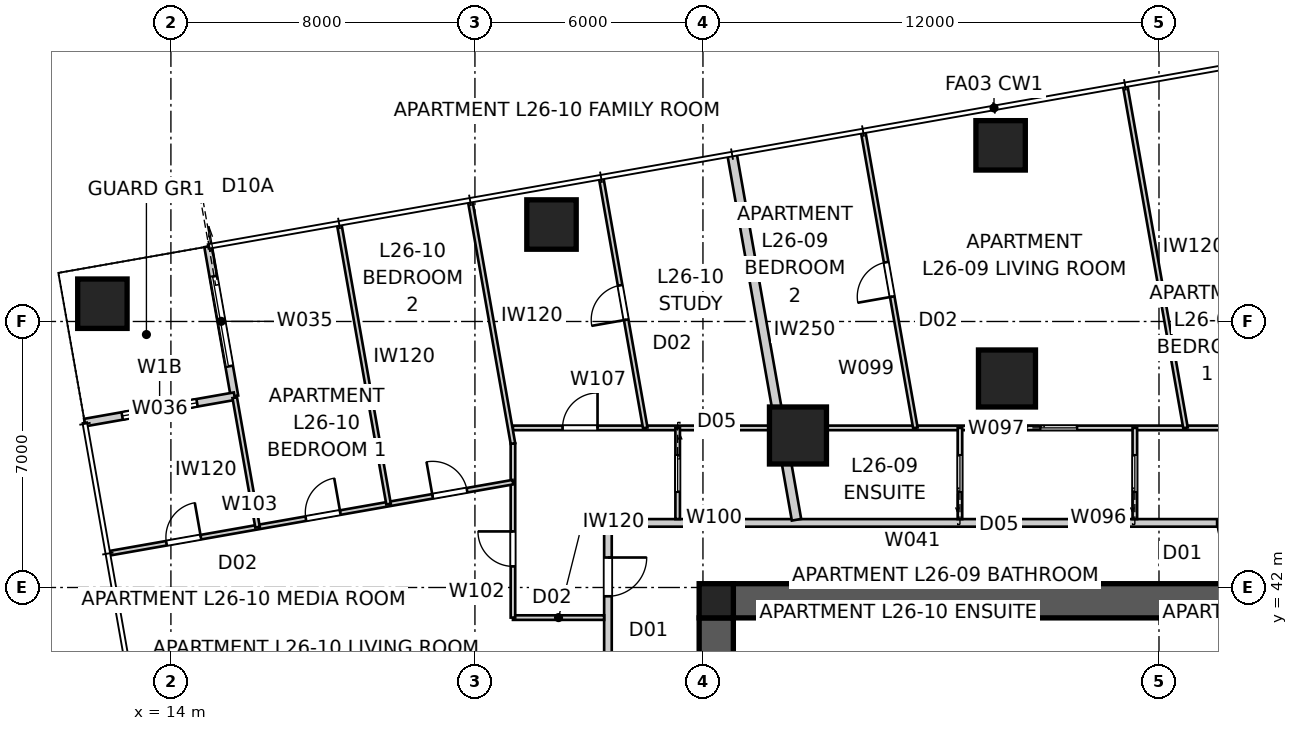
"""IFC4 building model, lengths in metres.
Left out: names, types, materials, properties, quantities, classifications, styles, units other than length and angle.
Written with IfcOpenShell. Run it as: python <this file> out.ifc"""

import sys

from ifc_helpers import new_model, si_unit, direction, frame, frame_2d, origin, origin_2d, place, context, subcontext, project, spatial, polyline, rectangle, outline, extrude, element, fill, save


model = new_model("IFC4")
c1 = context("Model", 3, precision=1e-05, world=origin(), true_north=direction((0.0, 1.0)))
c2 = subcontext(c1, "Body", "Model", "MODEL_VIEW")
j1 = project(units=[si_unit("LENGTHUNIT", "METRE"), si_unit("PLANEANGLEUNIT", "RADIAN")], contexts=[c1])
p1 = place(None, origin())
s1 = spatial("IfcSite", under=j1, at=p1, CompositionType="ELEMENT")
p2 = place(p1, origin())
s2 = spatial("IfcBuilding", under=s1, at=p2, CompositionType="ELEMENT")
p3 = place(p2, frame((0.0, 0.0, 96.4)))
s3 = spatial("IfcBuildingStorey", under=s2, at=p3, CompositionType="ELEMENT", Elevation=96.4)
p4 = place(p3, frame((28.8, 41.65, 0.0), z_axis=(0.0, 0.0, 1.0), x_axis=(1.0, 0.0, 0.0)))
e1 = element("IfcWall", 1, at=p4, inside=s3, PredefinedType="SHEAR", context=c2, shape_type="SweptSolid", body=[
    extrude(outline(polyline([(0.0, -0.45), (22.4, -0.45), (22.4, -0.025), (22.85, -0.025), (22.85, 0.025), (22.4, 0.025), (22.4, 0.45), (0.0, 0.45), (0.0, 0.025), (-0.45, 0.025), (-0.45, -0.025), (0.0, -0.025), (0.0, -0.45)])), origin(), (0.0, 0.0, 1.0), 3.4),
])
p5 = place(p3, frame((28.35, 41.2, 0.0), z_axis=(0.0, 0.0, 1.0), x_axis=(0.0, -1.0, 0.0)))
e2 = element("IfcWall", 2, at=p5, inside=s3, PredefinedType="SHEAR", context=c2, shape_type="SweptSolid", body=[
    extrude(outline(polyline([(0.0, -0.45), (22.4, -0.45), (22.4, -0.025), (22.85, -0.025), (22.85, 0.025), (22.4, 0.025), (22.4, 0.45), (0.0, 0.45), (0.0, 0.025), (-0.45, 0.025), (-0.45, -0.025), (0.0, -0.025), (0.0, -0.45)])), origin(), (0.0, 0.0, 1.0), 3.4),
])
p6 = place(p5, frame((11.14, 0.0, 0.0)))
e3 = element("IfcOpeningElement", 3, at=p6, cuts=e2, PredefinedType="OPENING", context=c2, shape_type="SweptSolid", body=[
    extrude(rectangle(XDim=1.02, YDim=2.4, at=frame_2d((0.51, 1.2))), frame((0.0, 0.46, 0.0), z_axis=(0.0, -1.0, 0.0), x_axis=(1.0, 0.0, 0.0)), (0.0, 0.0, 1.0), 0.92),
])
p7 = place(p3, frame((28.35, 41.65, 0.0), z_axis=(0.0, 0.0, 1.0), x_axis=(1.0, 0.0, 0.0)))
e4 = element("IfcColumn", 4, at=p7, inside=s3, PredefinedType="COLUMN", context=c2, shape_type="SweptSolid", body=[
    extrude(rectangle(XDim=0.9, YDim=0.9, at=origin_2d()), origin(), (0.0, 0.0, 1.0), 3.4),
])
for number, where, z_axis, x_axis in (
    (5, (35.833, 53.635, 0.0), (0.0, 0.0, 1.0), (1.0, 0.0, 0.0)),
    (6, (24.015, 51.552, 0.0), (0.0, 0.0, 1.0), (1.0, 0.0, 0.0)),
    (7, (12.197, 49.468, 0.0), (0.0, 0.0, 1.0), (1.0, 0.0, 0.0)),
):
    element("IfcColumn", number, at=place(p3, frame(where, z_axis=z_axis, x_axis=x_axis)), inside=s3, PredefinedType="COLUMN", context=c2, shape_type="SweptSolid", body=[
        extrude(rectangle(XDim=1.3, YDim=1.3, at=origin_2d()), origin(), (0.0, 0.0, 1.0), 3.4),
    ])
for number, where, z_axis, x_axis in (
    (8, (36.0, 47.5, 0.0), (0.0, 0.0, 1.0), (1.0, 0.0, 0.0)),
    (9, (30.5, 46.0, 0.0), (0.0, 0.0, 1.0), (1.0, 0.0, 0.0)),
):
    element("IfcColumn", number, at=place(p3, frame(where, z_axis=z_axis, x_axis=x_axis)), inside=s3, PredefinedType="COLUMN", context=c2, shape_type="SweptSolid", body=[
        extrude(rectangle(XDim=1.5, YDim=1.5, at=origin_2d()), origin(), (0.0, 0.0, 1.0), 3.4),
    ])
p8 = place(p3, frame((14.978, 50.974, 0.0), z_axis=(0.0, 0.0, 1.0), x_axis=(0.173646056486, -0.984808127031, 0.0)))
e10 = element("IfcWall", 10, at=p8, inside=s3, PredefinedType="SOLIDWALL", context=c2, shape_type="SweptSolid", body=[
    extrude(rectangle(XDim=4.0, YDim=0.2, at=frame_2d((2.0, 0.0))), origin(), (0.0, 0.0, 1.0), 3.25),
])
p9 = place(p8, frame((0.8, 0.0, 0.0)))
e11 = element("IfcOpeningElement", 11, at=p9, cuts=e10, PredefinedType="OPENING", context=c2, shape_type="SweptSolid", body=[
    extrude(rectangle(XDim=2.4, YDim=2.1, at=frame_2d((1.2, 1.05))), frame((0.0, 0.11, 0.0), z_axis=(0.0, -1.0, 0.0), x_axis=(1.0, 0.0, 0.0)), (0.0, 0.0, 1.0), 0.22),
])
p10 = place(p3, frame((15.672, 47.034, 0.0), z_axis=(0.0, 0.0, 1.0), x_axis=(-0.984808127031, -0.173646056486, 0.0)))
e12 = element("IfcWall", 12, at=p10, inside=s3, PredefinedType="SOLIDWALL", context=c2, shape_type="SweptSolid", body=[
    extrude(rectangle(XDim=4.0, YDim=0.2, at=frame_2d((2.0, 0.0))), origin(), (0.0, 0.0, 1.0), 3.25),
])
p11 = place(p10, frame((1.0, 0.0, 0.45)))
e13 = element("IfcOpeningElement", 13, at=p11, cuts=e12, PredefinedType="OPENING", context=c2, shape_type="SweptSolid", body=[
    extrude(rectangle(XDim=2.0, YDim=1.8, at=frame_2d((1.0, 0.9))), frame((0.0, 0.11, 0.0), z_axis=(0.0, -1.0, 0.0), x_axis=(1.0, 0.0, 0.0)), (0.0, 0.0, 1.0), 0.22),
])
p12 = place(p3, frame((54.5, 43.7, 0.0), z_axis=(0.0, 0.0, 1.0), x_axis=(-1.0, 0.0, 0.0)))
e14 = element("IfcWall", 14, at=p12, inside=s3, PredefinedType="PARTITIONING", context=c2, shape_type="SweptSolid", body=[
    extrude(rectangle(XDim=29.0, YDim=0.2, at=frame_2d((14.5, 0.0))), origin(), (0.0, 0.0, 1.0), 3.25),
])
p13 = place(p12, frame((11.951, 0.0, 0.0)))
e15 = element("IfcOpeningElement", 15, at=p13, cuts=e14, PredefinedType="OPENING", context=c2, shape_type="SweptSolid", body=[
    extrude(rectangle(XDim=1.02, YDim=2.34, at=frame_2d((0.51, 1.17))), frame((0.0, 0.11, 0.0), z_axis=(0.0, -1.0, 0.0), x_axis=(1.0, 0.0, 0.0)), (0.0, 0.0, 1.0), 0.22),
])
p14 = place(p12, frame((4.795, 0.0, 0.0)))
e16 = element("IfcOpeningElement", 16, at=p14, cuts=e14, PredefinedType="OPENING", context=c2, shape_type="SweptSolid", body=[
    extrude(rectangle(XDim=1.02, YDim=2.34, at=frame_2d((0.51, 1.17))), frame((0.0, 0.11, 0.0), z_axis=(0.0, -1.0, 0.0), x_axis=(1.0, 0.0, 0.0)), (0.0, 0.0, 1.0), 0.22),
])
p15 = place(p3, frame((25.5, 43.7, 0.0), z_axis=(0.0, 0.0, 1.0), x_axis=(0.0, -1.0, 0.0)))
e17 = element("IfcWall", 17, at=p15, inside=s3, PredefinedType="PARTITIONING", context=c2, shape_type="SweptSolid", body=[
    extrude(rectangle(XDim=27.4, YDim=0.2, at=frame_2d((13.7, 0.0))), origin(), (0.0, 0.0, 1.0), 3.25),
])
p16 = place(p15, frame((24.333, 0.0, 0.0)))
e18 = element("IfcOpeningElement", 18, at=p16, cuts=e17, PredefinedType="OPENING", context=c2, shape_type="SweptSolid", body=[
    extrude(rectangle(XDim=1.02, YDim=2.1, at=frame_2d((0.51, 1.05))), frame((0.0, 0.11, 0.0), z_axis=(0.0, -1.0, 0.0), x_axis=(1.0, 0.0, 0.0)), (0.0, 0.0, 1.0), 0.22),
])
p17 = place(p15, frame((10.631, 0.0, 0.0)))
e19 = element("IfcOpeningElement", 19, at=p17, cuts=e17, PredefinedType="OPENING", context=c2, shape_type="SweptSolid", body=[
    extrude(rectangle(XDim=1.02, YDim=2.34, at=frame_2d((0.51, 1.17))), frame((0.0, 0.11, 0.0), z_axis=(0.0, -1.0, 0.0), x_axis=(1.0, 0.0, 0.0)), (0.0, 0.0, 1.0), 0.22),
])
p18 = place(p15, frame((0.911, 0.0, 0.0)))
e20 = element("IfcOpeningElement", 20, at=p18, cuts=e17, PredefinedType="OPENING", context=c2, shape_type="SweptSolid", body=[
    extrude(rectangle(XDim=1.02, YDim=2.34, at=frame_2d((0.51, 1.17))), frame((0.0, 0.11, 0.0), z_axis=(0.0, -1.0, 0.0), x_axis=(1.0, 0.0, 0.0)), (0.0, 0.0, 1.0), 0.22),
])
p19 = place(p3, frame((28.765, 53.405, 0.0), z_axis=(0.0, 0.0, 1.0), x_axis=(0.173658469802, -0.984805938176, 0.0)))
e21 = element("IfcWall", 21, at=p19, inside=s3, PredefinedType="PARTITIONING", context=c2, shape_type="SweptSolid", body=[
    extrude(rectangle(XDim=9.771, YDim=0.25, at=frame_2d((4.885, 0.0))), origin(), (0.0, 0.0, 1.0), 3.25),
])
p20 = place(p3, frame((23.0, 46.2, 0.0), z_axis=(0.0, 0.0, 1.0), x_axis=(1.0, 0.0, 0.0)))
e22 = element("IfcWall", 22, at=p20, inside=s3, PredefinedType="PARTITIONING", context=c2, shape_type="SweptSolid", body=[
    extrude(rectangle(XDim=34.0, YDim=0.12, at=frame_2d((17.0, 0.0))), origin(), (0.0, 0.0, 1.0), 2.55),
])
p21 = place(p20, frame((18.989, 0.0, 0.0)))
e23 = element("IfcOpeningElement", 23, at=p21, cuts=e22, PredefinedType="OPENING", context=c2, shape_type="SweptSolid", body=[
    extrude(rectangle(XDim=0.92, YDim=2.34, at=frame_2d((0.46, 1.17))), frame((0.0, 0.07, 0.0), z_axis=(0.0, -1.0, 0.0), x_axis=(1.0, 0.0, 0.0)), (0.0, 0.0, 1.0), 0.14),
])
p22 = place(p20, frame((1.306, 0.0, 0.0)))
e24 = element("IfcOpeningElement", 24, at=p22, cuts=e22, PredefinedType="OPENING", context=c2, shape_type="SweptSolid", body=[
    extrude(rectangle(XDim=0.92, YDim=2.34, at=frame_2d((0.46, 1.17))), frame((0.0, 0.07, 0.0), z_axis=(0.0, -1.0, 0.0), x_axis=(1.0, 0.0, 0.0)), (0.0, 0.0, 1.0), 0.14),
])
p23 = place(p20, frame((13.884, 0.0, 0.0)))
e25 = element("IfcOpeningElement", 25, at=p23, cuts=e22, PredefinedType="OPENING", context=c2, shape_type="SweptSolid", body=[
    extrude(rectangle(XDim=0.96, YDim=2.1, at=frame_2d((0.48, 1.05))), frame((0.0, 0.07, 0.0), z_axis=(0.0, -1.0, 0.0), x_axis=(1.0, 0.0, 0.0)), (0.0, 0.0, 1.0), 0.14),
])
p24 = place(p20, frame((21.929, 0.0, 0.0)))
e26 = element("IfcOpeningElement", 26, at=p24, cuts=e22, PredefinedType="OPENING", context=c2, shape_type="SweptSolid", body=[
    extrude(rectangle(XDim=0.96, YDim=2.1, at=frame_2d((0.48, 1.05))), frame((0.0, 0.07, 0.0), z_axis=(0.0, -1.0, 0.0), x_axis=(1.0, 0.0, 0.0)), (0.0, 0.0, 1.0), 0.14),
])
p25 = place(p3, frame((39.365, 43.8, 0.0), z_axis=(0.0, 0.0, 1.0), x_axis=(0.0, 1.0, 0.0)))
e27 = element("IfcWall", 27, at=p25, inside=s3, PredefinedType="PARTITIONING", context=c2, shape_type="SweptSolid", body=[
    extrude(rectangle(XDim=2.4, YDim=0.12, at=frame_2d((1.2, 0.0))), origin(), (0.0, 0.0, 1.0), 3.25),
])
p26 = place(p25, frame((0.72, 0.0, 0.0)))
e28 = element("IfcOpeningElement", 28, at=p26, cuts=e27, PredefinedType="OPENING", context=c2, shape_type="SweptSolid", body=[
    extrude(rectangle(XDim=0.96, YDim=2.1, at=frame_2d((0.48, 1.05))), frame((0.0, 0.07, 0.0), z_axis=(0.0, -1.0, 0.0), x_axis=(1.0, 0.0, 0.0)), (0.0, 0.0, 1.0), 0.14),
])
p27 = place(p3, frame((34.763, 43.8, 0.0), z_axis=(0.0, 0.0, 1.0), x_axis=(0.0, 1.0, 0.0)))
e29 = element("IfcWall", 29, at=p27, inside=s3, PredefinedType="PARTITIONING", context=c2, shape_type="SweptSolid", body=[
    extrude(rectangle(XDim=2.4, YDim=0.12, at=frame_2d((1.2, 0.0))), origin(), (0.0, 0.0, 1.0), 3.25),
])
p28 = place(p27, frame((0.72, 0.0, 0.0)))
e30 = element("IfcOpeningElement", 30, at=p28, cuts=e29, PredefinedType="OPENING", context=c2, shape_type="SweptSolid", body=[
    extrude(rectangle(XDim=0.96, YDim=2.1, at=frame_2d((0.48, 1.05))), frame((0.0, 0.07, 0.0), z_axis=(0.0, -1.0, 0.0), x_axis=(1.0, 0.0, 0.0)), (0.0, 0.0, 1.0), 0.14),
])
p29 = place(p3, frame((39.113, 55.188, 0.0), z_axis=(0.0, 0.0, 1.0), x_axis=(0.173652576186, -0.984806977424, 0.0)))
e31 = element("IfcWall", 31, at=p29, inside=s3, PredefinedType="PARTITIONING", context=c2, shape_type="SweptSolid", body=[
    extrude(rectangle(XDim=9.127, YDim=0.12, at=frame_2d((4.563, 0.0))), origin(), (0.0, 0.0, 1.0), 3.25),
])
p30 = place(p3, frame((33.59, 46.2, 0.0), z_axis=(0.0, 0.0, 1.0), x_axis=(-0.173645935638, 0.98480814834, 0.0)))
e32 = element("IfcWall", 32, at=p30, inside=s3, PredefinedType="PARTITIONING", context=c2, shape_type="SweptSolid", body=[
    extrude(rectangle(XDim=7.893, YDim=0.12, at=frame_2d((3.947, 0.0))), origin(), (0.0, 0.0, 1.0), 3.25),
])
p31 = place(p30, frame((3.507, 0.0, 0.0)))
e33 = element("IfcOpeningElement", 33, at=p31, cuts=e32, PredefinedType="OPENING", context=c2, shape_type="SweptSolid", body=[
    extrude(rectangle(XDim=0.92, YDim=2.34, at=frame_2d((0.46, 1.17))), frame((0.0, 0.07, 0.0), z_axis=(0.0, -1.0, 0.0), x_axis=(1.0, 0.0, 0.0)), (0.0, 0.0, 1.0), 0.14),
])
p32 = place(p3, frame((27.335, 46.2, 0.0), z_axis=(0.0, 0.0, 1.0), x_axis=(0.0, -1.0, 0.0)))
e34 = element("IfcWall", 34, at=p32, inside=s3, PredefinedType="PARTITIONING", context=c2, shape_type="SweptSolid", body=[
    extrude(rectangle(XDim=2.4, YDim=0.12, at=frame_2d((1.2, 0.0))), origin(), (0.0, 0.0, 1.0), 2.722),
])
p33 = place(p32, frame((0.72, 0.0, 0.0)))
e35 = element("IfcOpeningElement", 35, at=p33, cuts=e34, PredefinedType="OPENING", context=c2, shape_type="SweptSolid", body=[
    extrude(rectangle(XDim=0.96, YDim=2.1, at=frame_2d((0.48, 1.05))), frame((0.0, 0.07, 0.0), z_axis=(0.0, -1.0, 0.0), x_axis=(1.0, 0.0, 0.0)), (0.0, 0.0, 1.0), 0.14),
])
p34 = place(p3, frame((25.4, 41.208, 0.0), z_axis=(0.0, 0.0, 1.0), x_axis=(-1.0, 0.0, 0.0)))
e36 = element("IfcWall", 36, at=p34, inside=s3, PredefinedType="PARTITIONING", context=c2, shape_type="SweptSolid", body=[
    extrude(rectangle(XDim=2.4, YDim=0.12, at=frame_2d((1.2, 0.0))), origin(), (0.0, 0.0, 1.0), 2.638),
])
p35 = place(p3, frame((23.0, 41.208, 0.0), z_axis=(0.0, 0.0, 1.0), x_axis=(0.0, 1.0, 0.0)))
e37 = element("IfcWall", 37, at=p35, inside=s3, PredefinedType="PARTITIONING", context=c2, shape_type="SweptSolid", body=[
    extrude(rectangle(XDim=4.581, YDim=0.12, at=frame_2d((2.291, 0.0))), origin(), (0.0, 0.0, 1.0), 2.638),
])
p36 = place(p35, frame((1.348, 0.0, 0.0)))
e38 = element("IfcOpeningElement", 38, at=p36, cuts=e37, PredefinedType="OPENING", context=c2, shape_type="SweptSolid", body=[
    extrude(rectangle(XDim=0.92, YDim=2.34, at=frame_2d((0.46, 1.17))), frame((0.0, 0.07, 0.0), z_axis=(0.0, -1.0, 0.0), x_axis=(1.0, 0.0, 0.0)), (0.0, 0.0, 1.0), 0.14),
])
p37 = place(p3, frame((12.38, 42.9, 0.0), z_axis=(0.0, 0.0, 1.0), x_axis=(0.984807253583, 0.173651010046, 0.0)))
e39 = element("IfcWall", 39, at=p37, inside=s3, PredefinedType="PARTITIONING", context=c2, shape_type="SweptSolid", body=[
    extrude(rectangle(XDim=10.783, YDim=0.12, at=frame_2d((5.392, 0.0))), origin(), (0.0, 0.0, 1.0), 3.25),
])
p38 = place(p37, frame((1.525, 0.0, 0.0)))
e40 = element("IfcOpeningElement", 40, at=p38, cuts=e39, PredefinedType="OPENING", context=c2, shape_type="SweptSolid", body=[
    extrude(rectangle(XDim=0.92, YDim=2.34, at=frame_2d((0.46, 1.17))), frame((0.0, 0.07, 0.0), z_axis=(0.0, -1.0, 0.0), x_axis=(1.0, 0.0, 0.0)), (0.0, 0.0, 1.0), 0.14),
])
p39 = place(p37, frame((5.25, 0.0, 0.0)))
e41 = element("IfcOpeningElement", 41, at=p39, cuts=e39, PredefinedType="OPENING", context=c2, shape_type="SweptSolid", body=[
    extrude(rectangle(XDim=0.92, YDim=2.34, at=frame_2d((0.46, 1.17))), frame((0.0, 0.07, 0.0), z_axis=(0.0, -1.0, 0.0), x_axis=(1.0, 0.0, 0.0)), (0.0, 0.0, 1.0), 0.14),
])
p40 = place(p37, frame((8.637, 0.0, 0.0)))
e42 = element("IfcOpeningElement", 42, at=p40, cuts=e39, PredefinedType="OPENING", context=c2, shape_type="SweptSolid", body=[
    extrude(rectangle(XDim=0.92, YDim=2.34, at=frame_2d((0.46, 1.17))), frame((0.0, 0.07, 0.0), z_axis=(0.0, -1.0, 0.0), x_axis=(1.0, 0.0, 0.0)), (0.0, 0.0, 1.0), 0.14),
])
p41 = place(p3, frame((18.432, 51.542, 0.0), z_axis=(0.0, 0.0, 1.0), x_axis=(0.173647177755, -0.984807929323, 0.0)))
e43 = element("IfcWall", 43, at=p41, inside=s3, PredefinedType="PARTITIONING", context=c2, shape_type="SweptSolid", body=[
    extrude(rectangle(XDim=7.46, YDim=0.12, at=frame_2d((3.73, 0.0))), origin(), (0.0, 0.0, 1.0), 3.25),
])
p42 = place(p3, frame((16.28, 43.588, 0.0), z_axis=(0.0, 0.0, 1.0), x_axis=(-0.173660541335, 0.984805572884, 0.0)))
e44 = element("IfcWall", 44, at=p42, inside=s3, PredefinedType="PARTITIONING", context=c2, shape_type="SweptSolid", body=[
    extrude(rectangle(XDim=3.46, YDim=0.12, at=frame_2d((1.73, 0.0))), origin(), (0.0, 0.0, 1.0), 3.25),
])
p43 = place(p3, frame((21.878, 52.15, 0.0), z_axis=(0.0, 0.0, 1.0), x_axis=(0.173653792983, -0.984806762864, 0.0)))
e45 = element("IfcWall", 45, at=p43, inside=s3, PredefinedType="PARTITIONING", context=c2, shape_type="SweptSolid", body=[
    extrude(rectangle(XDim=6.459, YDim=0.12, at=frame_2d((3.229, 0.0))), origin(), (0.0, 0.0, 1.0), 2.638),
])
p44 = place(p3, frame((26.481, 46.2, 0.0), z_axis=(0.0, 0.0, 1.0), x_axis=(-0.173643103339, 0.98480864774, 0.0)))
e46 = element("IfcWall", 46, at=p44, inside=s3, PredefinedType="PARTITIONING", context=c2, shape_type="SweptSolid", body=[
    extrude(rectangle(XDim=6.659, YDim=0.12, at=frame_2d((3.329, 0.0))), origin(), (0.0, 0.0, 1.0), 3.25),
])
p45 = place(p44, frame((2.889, 0.0, 0.0)))
e47 = element("IfcOpeningElement", 47, at=p45, cuts=e46, PredefinedType="OPENING", context=c2, shape_type="SweptSolid", body=[
    extrude(rectangle(XDim=0.92, YDim=2.34, at=frame_2d((0.46, 1.17))), frame((0.0, 0.07, 0.0), z_axis=(0.0, -1.0, 0.0), x_axis=(1.0, 0.0, 0.0)), (0.0, 0.0, 1.0), 0.14),
])
p46 = place(p9, origin())
e48 = element("IfcDoor", 48, at=p46, inside=s3, OperationType="SLIDING_TO_LEFT", PredefinedType="DOOR", context=c2, shape_type="SweptSolid", body=[
    extrude(rectangle(XDim=2.4, YDim=2.1, at=frame_2d((1.2, 1.05))), frame((0.0, 0.025, 0.0), z_axis=(0.0, -1.0, 0.0), x_axis=(1.0, 0.0, 0.0)), (0.0, 0.0, 1.0), 0.05),
])
fill(e11, e48)
p47 = place(p11, origin())
e49 = element("IfcWindow", 49, at=p47, inside=s3, PartitioningType="SINGLE_PANEL", PredefinedType="WINDOW", context=c2, shape_type="SweptSolid", body=[
    extrude(rectangle(XDim=2.0, YDim=1.8, at=frame_2d((1.0, 0.9))), frame((0.0, 0.03, 0.0), z_axis=(0.0, -1.0, 0.0), x_axis=(1.0, 0.0, 0.0)), (0.0, 0.0, 1.0), 0.06),
])
fill(e13, e49)
p48 = place(p13, origin())
e50 = element("IfcDoor", 50, at=p48, inside=s3, OperationType="SINGLE_SWING_LEFT", PredefinedType="DOOR", context=c2, shape_type="SweptSolid", body=[
    extrude(rectangle(XDim=1.02, YDim=2.34, at=frame_2d((0.51, 1.17))), frame((0.0, 0.025, 0.0), z_axis=(0.0, -1.0, 0.0), x_axis=(1.0, 0.0, 0.0)), (0.0, 0.0, 1.0), 0.05),
])
fill(e15, e50)
p49 = place(p18, origin())
e51 = element("IfcDoor", 51, at=p49, inside=s3, OperationType="SINGLE_SWING_LEFT", PredefinedType="DOOR", context=c2, shape_type="SweptSolid", body=[
    extrude(rectangle(XDim=1.02, YDim=2.34, at=frame_2d((0.51, 1.17))), frame((0.0, 0.025, 0.0), z_axis=(0.0, -1.0, 0.0), x_axis=(1.0, 0.0, 0.0)), (0.0, 0.0, 1.0), 0.05),
])
fill(e20, e51)
p50 = place(p26, origin())
e52 = element("IfcDoor", 52, at=p50, inside=s3, OperationType="SLIDING_TO_LEFT", PredefinedType="DOOR", context=c2, shape_type="SweptSolid", body=[
    extrude(rectangle(XDim=0.96, YDim=2.1, at=frame_2d((0.48, 1.05))), frame((0.0, 0.025, 0.0), z_axis=(0.0, -1.0, 0.0), x_axis=(1.0, 0.0, 0.0)), (0.0, 0.0, 1.0), 0.05),
])
fill(e28, e52)
p51 = place(p36, origin())
e53 = element("IfcDoor", 53, at=p51, inside=s3, OperationType="SINGLE_SWING_RIGHT", PredefinedType="DOOR", context=c2, shape_type="SweptSolid", body=[
    extrude(rectangle(XDim=0.92, YDim=2.34, at=frame_2d((0.46, 1.17))), frame((0.0, 0.025, 0.0), z_axis=(0.0, -1.0, 0.0), x_axis=(1.0, 0.0, 0.0)), (0.0, 0.0, 1.0), 0.05),
])
fill(e38, e53)
p52 = place(p22, origin())
e54 = element("IfcDoor", 54, at=p52, inside=s3, OperationType="SINGLE_SWING_RIGHT", PredefinedType="DOOR", context=c2, shape_type="SweptSolid", body=[
    extrude(rectangle(XDim=0.92, YDim=2.34, at=frame_2d((0.46, 1.17))), frame((0.0, 0.025, 0.0), z_axis=(0.0, -1.0, 0.0), x_axis=(1.0, 0.0, 0.0)), (0.0, 0.0, 1.0), 0.05),
])
fill(e24, e54)
p53 = place(p33, origin())
e55 = element("IfcDoor", 55, at=p53, inside=s3, OperationType="SLIDING_TO_LEFT", PredefinedType="DOOR", context=c2, shape_type="SweptSolid", body=[
    extrude(rectangle(XDim=0.96, YDim=2.1, at=frame_2d((0.48, 1.05))), frame((0.0, 0.025, 0.0), z_axis=(0.0, -1.0, 0.0), x_axis=(1.0, 0.0, 0.0)), (0.0, 0.0, 1.0), 0.05),
])
fill(e35, e55)
p54 = place(p23, origin())
e56 = element("IfcDoor", 56, at=p54, inside=s3, OperationType="SLIDING_TO_LEFT", PredefinedType="DOOR", context=c2, shape_type="SweptSolid", body=[
    extrude(rectangle(XDim=0.96, YDim=2.1, at=frame_2d((0.48, 1.05))), frame((0.0, 0.025, 0.0), z_axis=(0.0, -1.0, 0.0), x_axis=(1.0, 0.0, 0.0)), (0.0, 0.0, 1.0), 0.05),
])
fill(e25, e56)
p55 = place(p28, origin())
e57 = element("IfcDoor", 57, at=p55, inside=s3, OperationType="SLIDING_TO_LEFT", PredefinedType="DOOR", context=c2, shape_type="SweptSolid", body=[
    extrude(rectangle(XDim=0.96, YDim=2.1, at=frame_2d((0.48, 1.05))), frame((0.0, 0.025, 0.0), z_axis=(0.0, -1.0, 0.0), x_axis=(1.0, 0.0, 0.0)), (0.0, 0.0, 1.0), 0.05),
])
fill(e30, e57)
p56 = place(p38, origin())
e58 = element("IfcDoor", 58, at=p56, inside=s3, OperationType="SINGLE_SWING_RIGHT", PredefinedType="DOOR", context=c2, shape_type="SweptSolid", body=[
    extrude(rectangle(XDim=0.92, YDim=2.34, at=frame_2d((0.46, 1.17))), frame((0.0, 0.025, 0.0), z_axis=(0.0, -1.0, 0.0), x_axis=(1.0, 0.0, 0.0)), (0.0, 0.0, 1.0), 0.05),
])
fill(e40, e58)
p57 = place(p39, origin())
e59 = element("IfcDoor", 59, at=p57, inside=s3, OperationType="SINGLE_SWING_RIGHT", PredefinedType="DOOR", context=c2, shape_type="SweptSolid", body=[
    extrude(rectangle(XDim=0.92, YDim=2.34, at=frame_2d((0.46, 1.17))), frame((0.0, 0.025, 0.0), z_axis=(0.0, -1.0, 0.0), x_axis=(1.0, 0.0, 0.0)), (0.0, 0.0, 1.0), 0.05),
])
fill(e41, e59)
p58 = place(p40, origin())
e60 = element("IfcDoor", 60, at=p58, inside=s3, OperationType="SINGLE_SWING_LEFT", PredefinedType="DOOR", context=c2, shape_type="SweptSolid", body=[
    extrude(rectangle(XDim=0.92, YDim=2.34, at=frame_2d((0.46, 1.17))), frame((0.0, 0.025, 0.0), z_axis=(0.0, -1.0, 0.0), x_axis=(1.0, 0.0, 0.0)), (0.0, 0.0, 1.0), 0.05),
])
fill(e42, e60)
p59 = place(p45, origin())
e61 = element("IfcDoor", 61, at=p59, inside=s3, OperationType="SINGLE_SWING_LEFT", PredefinedType="DOOR", context=c2, shape_type="SweptSolid", body=[
    extrude(rectangle(XDim=0.92, YDim=2.34, at=frame_2d((0.46, 1.17))), frame((0.0, 0.025, 0.0), z_axis=(0.0, -1.0, 0.0), x_axis=(1.0, 0.0, 0.0)), (0.0, 0.0, 1.0), 0.05),
])
fill(e47, e61)
p60 = place(p31, origin())
e62 = element("IfcDoor", 62, at=p60, inside=s3, OperationType="SINGLE_SWING_LEFT", PredefinedType="DOOR", context=c2, shape_type="SweptSolid", body=[
    extrude(rectangle(XDim=0.92, YDim=2.34, at=frame_2d((0.46, 1.17))), frame((0.0, 0.025, 0.0), z_axis=(0.0, -1.0, 0.0), x_axis=(1.0, 0.0, 0.0)), (0.0, 0.0, 1.0), 0.05),
])
fill(e33, e62)
save(model, sys.argv[1])
